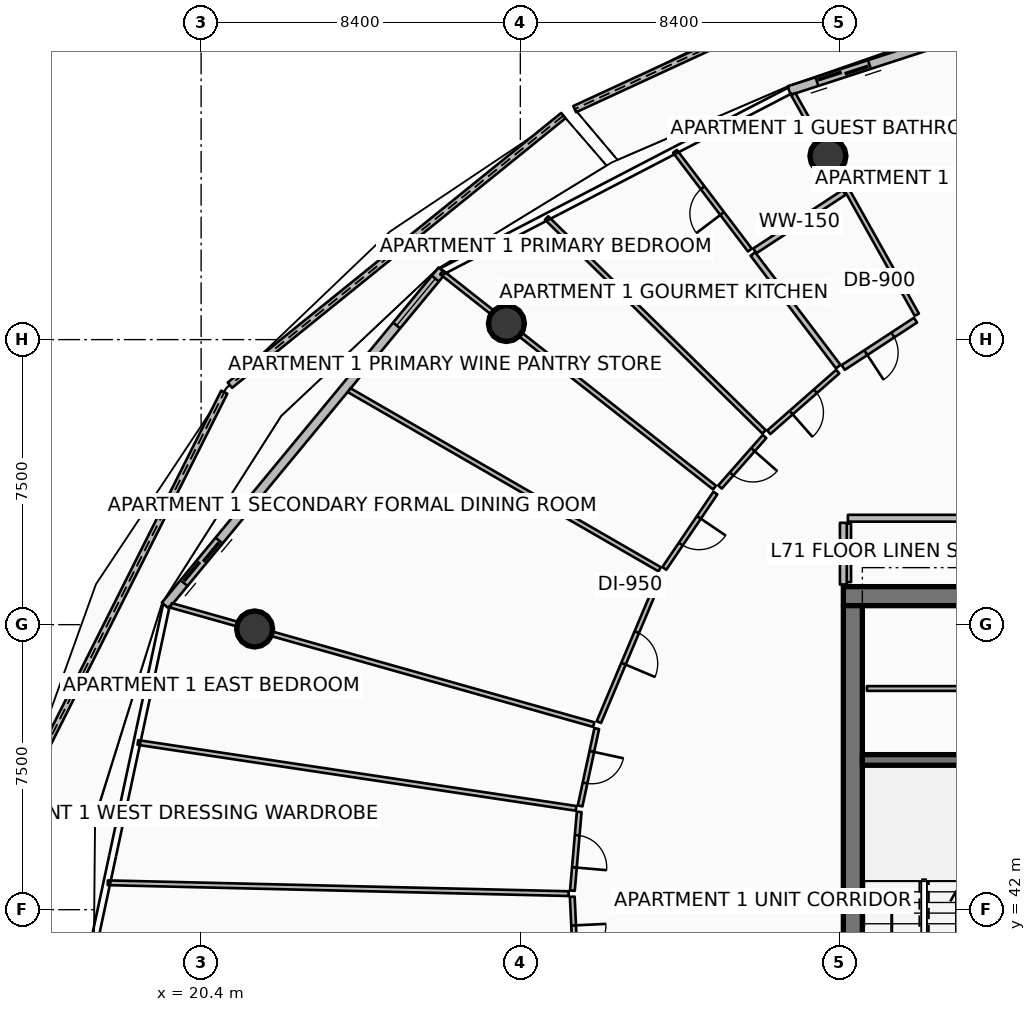
"""IFC4 building model, lengths in metres.
Left out: names, types, materials, properties, quantities, classifications, styles, units other than length and angle.
Written with IfcOpenShell. Run it as: python <this file> out.ifc"""

import sys

from ifc_helpers import new_model, si_unit, direction, frame, frame_2d, origin, origin_2d, place, context, subcontext, project, spatial, polyline, rectangle, circle, outline, extrude, element, fill, save


model = new_model("IFC4")
c1 = context("Model", 3, precision=1e-05, world=origin(), true_north=direction((0.0, 1.0)))
c2 = subcontext(c1, "Body", "Model", "MODEL_VIEW")
j1 = project(units=[si_unit("LENGTHUNIT", "METRE"), si_unit("PLANEANGLEUNIT", "RADIAN")], contexts=[c1])
p1 = place(None, origin())
s1 = spatial("IfcSite", under=j1, at=p1, CompositionType="ELEMENT")
p2 = place(p1, origin())
s2 = spatial("IfcBuilding", under=s1, at=p2, CompositionType="ELEMENT")
p3 = place(p2, frame((0.0, 0.0, 282.9)))
s3 = spatial("IfcBuildingStorey", under=s2, at=p3, CompositionType="ELEMENT", Elevation=282.9)
p4 = place(p3, frame((37.3, 50.25, 0.0), z_axis=(0.0, 0.0, 1.0), x_axis=(1.0, 0.0, 0.0)))
e1 = element("IfcWall", 1, at=p4, inside=s3, PredefinedType="SHEAR", context=c2, shape_type="SweptSolid", body=[
    extrude(rectangle(XDim=9.6, YDim=0.5, at=frame_2d((4.8, 0.0))), origin(), (0.0, 0.0, 1.0), 3.85),
])
p5 = place(p3, frame((37.55, 34.0, 0.0), z_axis=(0.0, 0.0, 1.0), x_axis=(0.0, 1.0, 0.0)))
e2 = element("IfcWall", 2, at=p5, inside=s3, PredefinedType="SHEAR", context=c2, shape_type="SweptSolid", body=[
    extrude(rectangle(XDim=16.0, YDim=0.5, at=frame_2d((8.0, 0.0))), origin(), (0.0, 0.0, 1.0), 3.85),
])
p6 = place(p3, frame((37.8, 45.94, 0.0), z_axis=(0.0, 0.0, 1.0), x_axis=(1.0, 0.0, 0.0)))
e3 = element("IfcWall", 3, at=p6, inside=s3, PredefinedType="SHEAR", context=c2, shape_type="SweptSolid", body=[
    extrude(rectangle(XDim=3.5, YDim=0.28, at=frame_2d((1.75, 0.0))), origin(), (0.0, 0.0, 1.0), 3.85),
])
for number, where, z_axis, x_axis in (
    (4, (36.895, 61.83, 0.0), (0.0, 0.0, 1.0), (1.0, 0.0, 0.0)),
    (5, (28.434, 57.425, 0.0), (0.0, 0.0, 1.0), (1.0, 0.0, 0.0)),
    (6, (21.809, 49.387, 0.0), (0.0, 0.0, 1.0), (1.0, 0.0, 0.0)),
):
    element("IfcColumn", number, at=place(p3, frame(where, z_axis=z_axis, x_axis=x_axis)), inside=s3, PredefinedType="COLUMN", context=c2, shape_type="SweptSolid", body=[
        extrude(circle(Radius=0.475, at=origin_2d()), origin(), (0.0, 0.0, 1.0), 3.59),
    ])
p7 = place(p3, frame((39.621, 67.402, 0.0), z_axis=(0.0, 0.0, 1.0), x_axis=(-0.907848132744, -0.419299138888, 0.0)))
e7 = element("IfcWall", 7, at=p7, inside=s3, PredefinedType="PARAPET", context=c2, shape_type="SweptSolid", body=[
    extrude(outline(polyline([(0.0, 0.0), (10.344, 0.0), (10.344, 1.233), (5.172, 1.418), (0.0, 1.632), (0.0, 0.0)])), frame((0.0, 0.09, 0.0), z_axis=(0.0, -1.0, 0.0), x_axis=(1.0, 0.0, 0.0)), (0.0, 0.0, 1.0), 0.18),
])
p8 = place(p3, frame((29.933, 62.895, 0.0), z_axis=(0.0, 0.0, 1.0), x_axis=(-0.777688536298, -0.628649775718, 0.0)))
e8 = element("IfcWall", 8, at=p8, inside=s3, PredefinedType="PARAPET", context=c2, shape_type="SweptSolid", body=[
    extrude(outline(polyline([(0.0, 0.0), (11.285, 0.0), (11.285, 1.148), (5.642, 1.127), (0.0, 1.224), (0.0, 0.0)])), frame((0.0, 0.09, 0.0), z_axis=(0.0, -1.0, 0.0), x_axis=(1.0, 0.0, 0.0)), (0.0, 0.0, 1.0), 0.18),
])
p9 = place(p3, frame((21.009, 55.618, 0.0), z_axis=(0.0, 0.0, 1.0), x_axis=(-0.449276289184, -0.893392867655, 0.0)))
e9 = element("IfcWall", 9, at=p9, inside=s3, PredefinedType="PARAPET", context=c2, shape_type="SweptSolid", body=[
    extrude(outline(polyline([(0.0, 0.0), (12.16, 0.0), (12.16, 1.483), (6.08, 1.284), (0.0, 1.148), (0.0, 0.0)])), frame((0.0, 0.09, 0.0), z_axis=(0.0, -1.0, 0.0), x_axis=(1.0, 0.0, 0.0)), (0.0, 0.0, 1.0), 0.18),
])
p10 = place(p3, frame((45.142, 66.564, 0.0), z_axis=(0.0, 0.0, 1.0), x_axis=(-0.951055974609, -0.309018661507, 0.0)))
e10 = element("IfcWall", 10, at=p10, inside=s3, PredefinedType="SOLIDWALL", context=c2, shape_type="SweptSolid", body=[
    extrude(rectangle(XDim=9.745, YDim=0.24, at=frame_2d((4.873, 0.0))), origin(), (0.0, 0.0, 1.0), 2.54),
])
p11 = place(p10, frame((7.525, 0.0, 0.0)))
e11 = element("IfcOpeningElement", 11, at=p11, cuts=e10, PredefinedType="OPENING", context=c2, shape_type="SweptSolid", body=[
    extrude(rectangle(XDim=1.45, YDim=2.15, at=frame_2d((0.725, 1.075))), frame((0.0, 0.13, 0.0), z_axis=(0.0, -1.0, 0.0), x_axis=(1.0, 0.0, 0.0)), (0.0, 0.0, 1.0), 0.26),
])
p12 = place(p10, frame((0.28, 0.0, 0.65)))
e12 = element("IfcOpeningElement", 12, at=p12, cuts=e10, PredefinedType="OPENING", context=c2, shape_type="SweptSolid", body=[
    extrude(rectangle(XDim=1.6, YDim=1.5, at=frame_2d((0.8, 0.75))), frame((0.0, 0.13, 0.0), z_axis=(0.0, -1.0, 0.0), x_axis=(1.0, 0.0, 0.0)), (0.0, 0.0, 1.0), 0.26),
])
p13 = place(p3, frame((26.742, 58.822, 0.0), z_axis=(0.0, 0.0, 1.0), x_axis=(-0.636680093065, -0.771128043255, 0.0)))
e13 = element("IfcWall", 13, at=p13, inside=s3, PredefinedType="SOLIDWALL", context=c2, shape_type="SweptSolid", body=[
    extrude(rectangle(XDim=11.438, YDim=0.24, at=frame_2d((5.719, 0.0))), origin(), (0.0, 0.0, 1.0), 2.54),
])
p14 = place(p13, frame((9.218, 0.0, 0.0)))
e14 = element("IfcOpeningElement", 14, at=p14, cuts=e13, PredefinedType="OPENING", context=c2, shape_type="SweptSolid", body=[
    extrude(rectangle(XDim=1.45, YDim=2.15, at=frame_2d((0.725, 1.075))), frame((0.0, 0.13, 0.0), z_axis=(0.0, -1.0, 0.0), x_axis=(1.0, 0.0, 0.0)), (0.0, 0.0, 1.0), 0.26),
])
p15 = place(p13, frame((0.28, 0.0, 0.65)))
e15 = element("IfcOpeningElement", 15, at=p15, cuts=e13, PredefinedType="OPENING", context=c2, shape_type="SweptSolid", body=[
    extrude(rectangle(XDim=1.6, YDim=1.5, at=frame_2d((0.8, 0.75))), frame((0.0, 0.13, 0.0), z_axis=(0.0, -1.0, 0.0), x_axis=(1.0, 0.0, 0.0)), (0.0, 0.0, 1.0), 0.26),
])
p16 = place(p3, frame((37.92, 47.82, 0.0), z_axis=(0.0, 0.0, 1.0), x_axis=(1.0, 0.0, 0.0)))
e16 = element("IfcWall", 16, at=p16, inside=s3, PredefinedType="PARTITIONING", context=c2, shape_type="SweptSolid", body=[
    extrude(rectangle(XDim=8.78, YDim=0.125, at=frame_2d((4.39, 0.0))), origin(), (0.0, 0.0, 1.0), 3.03),
])
p17 = place(p16, frame((3.965, 0.0, 0.0)))
e17 = element("IfcOpeningElement", 17, at=p17, cuts=e16, PredefinedType="OPENING", context=c2, shape_type="SweptSolid", body=[
    extrude(rectangle(XDim=0.85, YDim=2.06, at=frame_2d((0.425, 1.03))), frame((0.0, 0.073, 0.0), z_axis=(0.0, -1.0, 0.0), x_axis=(1.0, 0.0, 0.0)), (0.0, 0.0, 1.0), 0.145),
])
p18 = place(p3, frame((37.44, 50.62, 0.0), z_axis=(0.0, 0.0, 1.0), x_axis=(0.0, 1.0, 0.0)))
e18 = element("IfcWall", 18, at=p18, inside=s3, PredefinedType="PARTITIONING", context=c2, shape_type="SweptSolid", body=[
    extrude(rectangle(XDim=1.54, YDim=0.125, at=frame_2d((0.77, 0.0))), origin(), (0.0, 0.0, 1.0), 3.03),
])
p19 = place(p3, frame((42.112, 52.3, 0.0), z_axis=(0.0, 0.0, 1.0), x_axis=(-1.0, 0.0, 0.0)))
e19 = element("IfcWall", 19, at=p19, inside=s3, PredefinedType="PARTITIONING", context=c2, shape_type="SweptSolid", body=[
    extrude(rectangle(XDim=4.692, YDim=0.18, at=frame_2d((2.346, 0.0))), origin(), (0.0, 0.0, 1.0), 2.957),
])
p20 = place(p3, frame((37.3, 52.18, 0.0), z_axis=(0.0, 0.0, 1.0), x_axis=(0.0, -1.0, 0.0)))
e20 = element("IfcWall", 20, at=p20, inside=s3, PredefinedType="PARTITIONING", context=c2, shape_type="SweptSolid", body=[
    extrude(rectangle(XDim=1.625, YDim=0.18, at=frame_2d((0.812, 0.0))), origin(), (0.0, 0.0, 1.0), 2.957),
])
p21 = place(p3, frame((39.233, 57.654, 0.0), z_axis=(0.0, 0.0, 1.0), x_axis=(-0.488631305502, 0.872490370883, 0.0)))
e21 = element("IfcWall", 21, at=p21, inside=s3, PredefinedType="PARTITIONING", context=c2, shape_type="SweptSolid", body=[
    extrude(rectangle(XDim=6.653, YDim=0.125, at=frame_2d((3.326, 0.0))), origin(), (0.0, 0.0, 1.0), 2.957),
])
p22 = place(p3, frame((39.198, 57.512, 0.0), z_axis=(0.0, 0.0, 1.0), x_axis=(-0.836678262568, -0.547694700491, 0.0)))
e22 = element("IfcWall", 22, at=p22, inside=s3, PredefinedType="PARTITIONING", context=c2, shape_type="SweptSolid", body=[
    extrude(rectangle(XDim=2.274, YDim=0.15, at=frame_2d((1.137, 0.0))), origin(), (0.0, 0.0, 1.0), 2.957),
])
p23 = place(p22, frame((0.712, 0.0, 0.0)))
e23 = element("IfcOpeningElement", 23, at=p23, cuts=e22, PredefinedType="OPENING", context=c2, shape_type="SweptSolid", body=[
    extrude(rectangle(XDim=0.85, YDim=2.06, at=frame_2d((0.425, 1.03))), frame((0.0, 0.085, 0.0), z_axis=(0.0, -1.0, 0.0), x_axis=(1.0, 0.0, 0.0)), (0.0, 0.0, 1.0), 0.17),
])
p24 = place(p3, frame((37.317, 60.871, 0.0), z_axis=(0.0, 0.0, 1.0), x_axis=(-0.836665995214, -0.547713440087, 0.0)))
e24 = element("IfcWall", 24, at=p24, inside=s3, PredefinedType="PARTITIONING", context=c2, shape_type="SweptSolid", body=[
    extrude(rectangle(XDim=2.806, YDim=0.15, at=frame_2d((1.403, 0.0))), origin(), (0.0, 0.0, 1.0), 2.957),
])
p25 = place(p3, frame((37.166, 56.289, 0.0), z_axis=(0.0, 0.0, 1.0), x_axis=(-0.604171001441, 0.796854692537, 0.0)))
e25 = element("IfcWall", 25, at=p25, inside=s3, PredefinedType="PARTITIONING", context=c2, shape_type="SweptSolid", body=[
    extrude(rectangle(XDim=3.72, YDim=0.15, at=frame_2d((1.86, 0.0))), origin(), (0.0, 0.0, 1.0), 3.03),
])
p26 = place(p3, frame((34.84, 59.357, 0.0), z_axis=(0.0, 0.0, 1.0), x_axis=(-0.604173390314, 0.7968528813, 0.0)))
e26 = element("IfcWall", 26, at=p26, inside=s3, PredefinedType="PARTITIONING", context=c2, shape_type="SweptSolid", body=[
    extrude(rectangle(XDim=3.26, YDim=0.125, at=frame_2d((1.63, 0.0))), origin(), (0.0, 0.0, 1.0), 3.03),
])
p27 = place(p26, frame((1.205, 0.0, 0.0)))
e27 = element("IfcOpeningElement", 27, at=p27, cuts=e26, PredefinedType="OPENING", context=c2, shape_type="SweptSolid", body=[
    extrude(rectangle(XDim=0.85, YDim=2.06, at=frame_2d((0.425, 1.03))), frame((0.0, 0.073, 0.0), z_axis=(0.0, -1.0, 0.0), x_axis=(1.0, 0.0, 0.0)), (0.0, 0.0, 1.0), 0.145),
])
p28 = place(p3, frame((35.214, 54.573, 0.0), z_axis=(0.0, 0.0, 1.0), x_axis=(-0.712998082221, 0.701165982311, 0.0)))
e28 = element("IfcWall", 28, at=p28, inside=s3, PredefinedType="PARTITIONING", context=c2, shape_type="SweptSolid", body=[
    extrude(rectangle(XDim=8.027, YDim=0.125, at=frame_2d((4.013, 0.0))), origin(), (0.0, 0.0, 1.0), 3.03),
])
p29 = place(p3, frame((37.153, 56.158, 0.0), z_axis=(0.0, 0.0, 1.0), x_axis=(-0.750978090344, -0.660327121829, 0.0)))
e29 = element("IfcWall", 29, at=p29, inside=s3, PredefinedType="PARTITIONING", context=c2, shape_type="SweptSolid", body=[
    extrude(rectangle(XDim=2.416, YDim=0.125, at=frame_2d((1.208, 0.0))), origin(), (0.0, 0.0, 1.0), 3.03),
])
p30 = place(p29, frame((0.783, 0.0, 0.0)))
e30 = element("IfcOpeningElement", 30, at=p30, cuts=e29, PredefinedType="OPENING", context=c2, shape_type="SweptSolid", body=[
    extrude(rectangle(XDim=0.85, YDim=2.06, at=frame_2d((0.425, 1.03))), frame((0.0, 0.073, 0.0), z_axis=(0.0, -1.0, 0.0), x_axis=(1.0, 0.0, 0.0)), (0.0, 0.0, 1.0), 0.145),
])
p31 = place(p3, frame((35.226, 54.45, 0.0), z_axis=(0.0, 0.0, 1.0), x_axis=(-0.661115526194, -0.7502841202, 0.0)))
e31 = element("IfcWall", 31, at=p31, inside=s3, PredefinedType="PARTITIONING", context=c2, shape_type="SweptSolid", body=[
    extrude(rectangle(XDim=1.771, YDim=0.125, at=frame_2d((0.886, 0.0))), origin(), (0.0, 0.0, 1.0), 2.957),
])
p32 = place(p31, frame((0.461, 0.0, 0.0)))
e32 = element("IfcOpeningElement", 32, at=p32, cuts=e31, PredefinedType="OPENING", context=c2, shape_type="SweptSolid", body=[
    extrude(rectangle(XDim=0.85, YDim=2.06, at=frame_2d((0.425, 1.03))), frame((0.0, 0.073, 0.0), z_axis=(0.0, -1.0, 0.0), x_axis=(1.0, 0.0, 0.0)), (0.0, 0.0, 1.0), 0.145),
])
p33 = place(p3, frame((33.91, 53.108, 0.0), z_axis=(0.0, 0.0, 1.0), x_axis=(-0.785332331122, 0.619074413697, 0.0)))
e33 = element("IfcWall", 33, at=p33, inside=s3, PredefinedType="PARTITIONING", context=c2, shape_type="SweptSolid", body=[
    extrude(rectangle(XDim=9.143, YDim=0.125, at=frame_2d((4.571, 0.0))), origin(), (0.0, 0.0, 1.0), 2.957),
])
p34 = place(p3, frame((32.466, 50.958, 0.0), z_axis=(0.0, 0.0, 1.0), x_axis=(-0.86629721787, 0.499528908383, 0.0)))
e34 = element("IfcWall", 34, at=p34, inside=s3, PredefinedType="PARTITIONING", context=c2, shape_type="SweptSolid", body=[
    extrude(rectangle(XDim=9.428, YDim=0.125, at=frame_2d((4.714, 0.0))), origin(), (0.0, 0.0, 1.0), 3.03),
])
p35 = place(p3, frame((33.932, 52.963, 0.0), z_axis=(0.0, 0.0, 1.0), x_axis=(-0.560751274748, -0.82798430412, 0.0)))
e35 = element("IfcWall", 35, at=p35, inside=s3, PredefinedType="PARTITIONING", context=c2, shape_type="SweptSolid", body=[
    extrude(rectangle(XDim=2.396, YDim=0.125, at=frame_2d((1.198, 0.0))), origin(), (0.0, 0.0, 1.0), 2.957),
])
p36 = place(p35, frame((0.773, 0.0, 0.0)))
e36 = element("IfcOpeningElement", 36, at=p36, cuts=e35, PredefinedType="OPENING", context=c2, shape_type="SweptSolid", body=[
    extrude(rectangle(XDim=0.85, YDim=2.06, at=frame_2d((0.425, 1.03))), frame((0.0, 0.073, 0.0), z_axis=(0.0, -1.0, 0.0), x_axis=(1.0, 0.0, 0.0)), (0.0, 0.0, 1.0), 0.145),
])
p37 = place(p3, frame((32.513, 50.839, 0.0), z_axis=(0.0, 0.0, 1.0), x_axis=(-0.388494891754, -0.921450877194, 0.0)))
e37 = element("IfcWall", 37, at=p37, inside=s3, PredefinedType="PARTITIONING", context=c2, shape_type="SweptSolid", body=[
    extrude(rectangle(XDim=4.237, YDim=0.125, at=frame_2d((2.118, 0.0))), origin(), (0.0, 0.0, 1.0), 2.957),
])
p38 = place(p37, frame((1.668, 0.0, 0.0)))
e38 = element("IfcOpeningElement", 38, at=p38, cuts=e37, PredefinedType="OPENING", context=c2, shape_type="SweptSolid", body=[
    extrude(rectangle(XDim=0.9, YDim=2.08, at=frame_2d((0.45, 1.04))), frame((0.0, 0.073, 0.0), z_axis=(0.0, -1.0, 0.0), x_axis=(1.0, 0.0, 0.0)), (0.0, 0.0, 1.0), 0.145),
])
p39 = place(p3, frame((30.732, 46.87, 0.0), z_axis=(0.0, 0.0, 1.0), x_axis=(-0.962452931787, 0.271448621462, 0.0)))
e39 = element("IfcWall", 39, at=p39, inside=s3, PredefinedType="PARTITIONING", context=c2, shape_type="SweptSolid", body=[
    extrude(rectangle(XDim=11.554, YDim=0.125, at=frame_2d((5.777, 0.0))), origin(), (0.0, 0.0, 1.0), 2.957),
])
p40 = place(p3, frame((30.267, 44.666, 0.0), z_axis=(0.0, 0.0, 1.0), x_axis=(-0.988886077573, 0.148675235266, 0.0)))
e40 = element("IfcWall", 40, at=p40, inside=s3, PredefinedType="PARTITIONING", context=c2, shape_type="SweptSolid", body=[
    extrude(rectangle(XDim=11.661, YDim=0.125, at=frame_2d((5.83, 0.0))), origin(), (0.0, 0.0, 1.0), 3.03),
])
p41 = place(p3, frame((30.073, 42.423, 0.0), z_axis=(0.0, 0.0, 1.0), x_axis=(-0.999722774678, 0.023545143653, 0.0)))
e41 = element("IfcWall", 41, at=p41, inside=s3, PredefinedType="PARTITIONING", context=c2, shape_type="SweptSolid", body=[
    extrude(rectangle(XDim=12.132, YDim=0.125, at=frame_2d((6.066, 0.0))), origin(), (0.0, 0.0, 1.0), 3.03),
])
p42 = place(p3, frame((30.811, 46.765, 0.0), z_axis=(0.0, 0.0, 1.0), x_axis=(-0.210490523381, -0.977595897888, 0.0)))
e42 = element("IfcWall", 42, at=p42, inside=s3, PredefinedType="PARTITIONING", context=c2, shape_type="SweptSolid", body=[
    extrude(rectangle(XDim=2.081, YDim=0.125, at=frame_2d((1.041, 0.0))), origin(), (0.0, 0.0, 1.0), 2.957),
])
p43 = place(p42, frame((0.615, 0.0, 0.0)))
e43 = element("IfcOpeningElement", 43, at=p43, cuts=e42, PredefinedType="OPENING", context=c2, shape_type="SweptSolid", body=[
    extrude(rectangle(XDim=0.85, YDim=2.06, at=frame_2d((0.425, 1.03))), frame((0.0, 0.073, 0.0), z_axis=(0.0, -1.0, 0.0), x_axis=(1.0, 0.0, 0.0)), (0.0, 0.0, 1.0), 0.145),
])
p44 = place(p3, frame((30.349, 44.573, 0.0), z_axis=(0.0, 0.0, 1.0), x_axis=(-0.08623974721, -0.996274413001, 0.0)))
e44 = element("IfcWall", 44, at=p44, inside=s3, PredefinedType="PARTITIONING", context=c2, shape_type="SweptSolid", body=[
    extrude(rectangle(XDim=2.081, YDim=0.125, at=frame_2d((1.041, 0.0))), origin(), (0.0, 0.0, 1.0), 3.03),
])
p45 = place(p44, frame((0.615, 0.0, 0.0)))
e45 = element("IfcOpeningElement", 45, at=p45, cuts=e44, PredefinedType="OPENING", context=c2, shape_type="SweptSolid", body=[
    extrude(rectangle(XDim=0.85, YDim=2.06, at=frame_2d((0.425, 1.03))), frame((0.0, 0.073, 0.0), z_axis=(0.0, -1.0, 0.0), x_axis=(1.0, 0.0, 0.0)), (0.0, 0.0, 1.0), 0.145),
])
p46 = place(p3, frame((30.167, 42.341, 0.0), z_axis=(0.0, 0.0, 1.0), x_axis=(0.047063871423, -0.998891882041, 0.0)))
e46 = element("IfcWall", 46, at=p46, inside=s3, PredefinedType="PARTITIONING", context=c2, shape_type="SweptSolid", body=[
    extrude(rectangle(XDim=2.36, YDim=0.125, at=frame_2d((1.18, 0.0))), origin(), (0.0, 0.0, 1.0), 2.957),
])
p47 = place(p46, frame((0.755, 0.0, 0.0)))
e47 = element("IfcOpeningElement", 47, at=p47, cuts=e46, PredefinedType="OPENING", context=c2, shape_type="SweptSolid", body=[
    extrude(rectangle(XDim=0.85, YDim=2.06, at=frame_2d((0.425, 1.03))), frame((0.0, 0.073, 0.0), z_axis=(0.0, -1.0, 0.0), x_axis=(1.0, 0.0, 0.0)), (0.0, 0.0, 1.0), 0.145),
])
p48 = place(p11, origin())
e48 = element("IfcDoor", 48, at=p48, inside=s3, OperationType="DOUBLE_DOOR_SLIDING", PredefinedType="DOOR", context=c2, shape_type="SweptSolid", body=[
    extrude(rectangle(XDim=1.45, YDim=2.15, at=frame_2d((0.725, 1.075))), frame((0.0, 0.025, 0.0), z_axis=(0.0, -1.0, 0.0), x_axis=(1.0, 0.0, 0.0)), (0.0, 0.0, 1.0), 0.05),
])
fill(e11, e48)
p49 = place(p14, origin())
e49 = element("IfcDoor", 49, at=p49, inside=s3, OperationType="DOUBLE_DOOR_SLIDING", PredefinedType="DOOR", context=c2, shape_type="SweptSolid", body=[
    extrude(rectangle(XDim=1.45, YDim=2.15, at=frame_2d((0.725, 1.075))), frame((0.0, 0.025, 0.0), z_axis=(0.0, -1.0, 0.0), x_axis=(1.0, 0.0, 0.0)), (0.0, 0.0, 1.0), 0.05),
])
fill(e14, e49)
p50 = place(p15, origin())
e50 = element("IfcWindow", 50, at=p50, inside=s3, PartitioningType="SINGLE_PANEL", PredefinedType="WINDOW", context=c2, shape_type="SweptSolid", body=[
    extrude(rectangle(XDim=1.6, YDim=1.5, at=frame_2d((0.8, 0.75))), frame((0.0, 0.03, 0.0), z_axis=(0.0, -1.0, 0.0), x_axis=(1.0, 0.0, 0.0)), (0.0, 0.0, 1.0), 0.06),
])
fill(e15, e50)
p51 = place(p23, origin())
e51 = element("IfcDoor", 51, at=p51, inside=s3, OperationType="SINGLE_SWING_RIGHT", PredefinedType="DOOR", context=c2, shape_type="SweptSolid", body=[
    extrude(rectangle(XDim=0.85, YDim=2.06, at=frame_2d((0.425, 1.03))), frame((0.0, 0.025, 0.0), z_axis=(0.0, -1.0, 0.0), x_axis=(1.0, 0.0, 0.0)), (0.0, 0.0, 1.0), 0.05),
])
fill(e23, e51)
p52 = place(p27, origin())
e52 = element("IfcDoor", 52, at=p52, inside=s3, OperationType="SINGLE_SWING_LEFT", PredefinedType="DOOR", context=c2, shape_type="SweptSolid", body=[
    extrude(rectangle(XDim=0.85, YDim=2.06, at=frame_2d((0.425, 1.03))), frame((0.0, 0.025, 0.0), z_axis=(0.0, -1.0, 0.0), x_axis=(1.0, 0.0, 0.0)), (0.0, 0.0, 1.0), 0.05),
])
fill(e27, e52)
p53 = place(p30, origin())
e53 = element("IfcDoor", 53, at=p53, inside=s3, OperationType="SINGLE_SWING_RIGHT", PredefinedType="DOOR", context=c2, shape_type="SweptSolid", body=[
    extrude(rectangle(XDim=0.85, YDim=2.06, at=frame_2d((0.425, 1.03))), frame((0.0, 0.025, 0.0), z_axis=(0.0, -1.0, 0.0), x_axis=(1.0, 0.0, 0.0)), (0.0, 0.0, 1.0), 0.05),
])
fill(e30, e53)
p54 = place(p32, origin())
e54 = element("IfcDoor", 54, at=p54, inside=s3, OperationType="SINGLE_SWING_LEFT", PredefinedType="DOOR", context=c2, shape_type="SweptSolid", body=[
    extrude(rectangle(XDim=0.85, YDim=2.06, at=frame_2d((0.425, 1.03))), frame((0.0, 0.025, 0.0), z_axis=(0.0, -1.0, 0.0), x_axis=(1.0, 0.0, 0.0)), (0.0, 0.0, 1.0), 0.05),
])
fill(e32, e54)
p55 = place(p36, origin())
e55 = element("IfcDoor", 55, at=p55, inside=s3, OperationType="SINGLE_SWING_LEFT", PredefinedType="DOOR", context=c2, shape_type="SweptSolid", body=[
    extrude(rectangle(XDim=0.85, YDim=2.06, at=frame_2d((0.425, 1.03))), frame((0.0, 0.025, 0.0), z_axis=(0.0, -1.0, 0.0), x_axis=(1.0, 0.0, 0.0)), (0.0, 0.0, 1.0), 0.05),
])
fill(e36, e55)
p56 = place(p38, origin())
e56 = element("IfcDoor", 56, at=p56, inside=s3, OperationType="SINGLE_SWING_RIGHT", PredefinedType="DOOR", context=c2, shape_type="SweptSolid", body=[
    extrude(rectangle(XDim=0.9, YDim=2.08, at=frame_2d((0.45, 1.04))), frame((0.0, 0.025, 0.0), z_axis=(0.0, -1.0, 0.0), x_axis=(1.0, 0.0, 0.0)), (0.0, 0.0, 1.0), 0.05),
])
fill(e38, e56)
p57 = place(p43, origin())
e57 = element("IfcDoor", 57, at=p57, inside=s3, OperationType="SINGLE_SWING_LEFT", PredefinedType="DOOR", context=c2, shape_type="SweptSolid", body=[
    extrude(rectangle(XDim=0.85, YDim=2.06, at=frame_2d((0.425, 1.03))), frame((0.0, 0.025, 0.0), z_axis=(0.0, -1.0, 0.0), x_axis=(1.0, 0.0, 0.0)), (0.0, 0.0, 1.0), 0.05),
])
fill(e43, e57)
p58 = place(p45, origin())
e58 = element("IfcDoor", 58, at=p58, inside=s3, OperationType="SINGLE_SWING_RIGHT", PredefinedType="DOOR", context=c2, shape_type="SweptSolid", body=[
    extrude(rectangle(XDim=0.85, YDim=2.06, at=frame_2d((0.425, 1.03))), frame((0.0, 0.025, 0.0), z_axis=(0.0, -1.0, 0.0), x_axis=(1.0, 0.0, 0.0)), (0.0, 0.0, 1.0), 0.05),
])
fill(e45, e58)
p59 = place(p47, origin())
e59 = element("IfcDoor", 59, at=p59, inside=s3, OperationType="SINGLE_SWING_LEFT", PredefinedType="DOOR", context=c2, shape_type="SweptSolid", body=[
    extrude(rectangle(XDim=0.85, YDim=2.06, at=frame_2d((0.425, 1.03))), frame((0.0, 0.025, 0.0), z_axis=(0.0, -1.0, 0.0), x_axis=(1.0, 0.0, 0.0)), (0.0, 0.0, 1.0), 0.05),
])
fill(e47, e59)
save(model, sys.argv[1])
